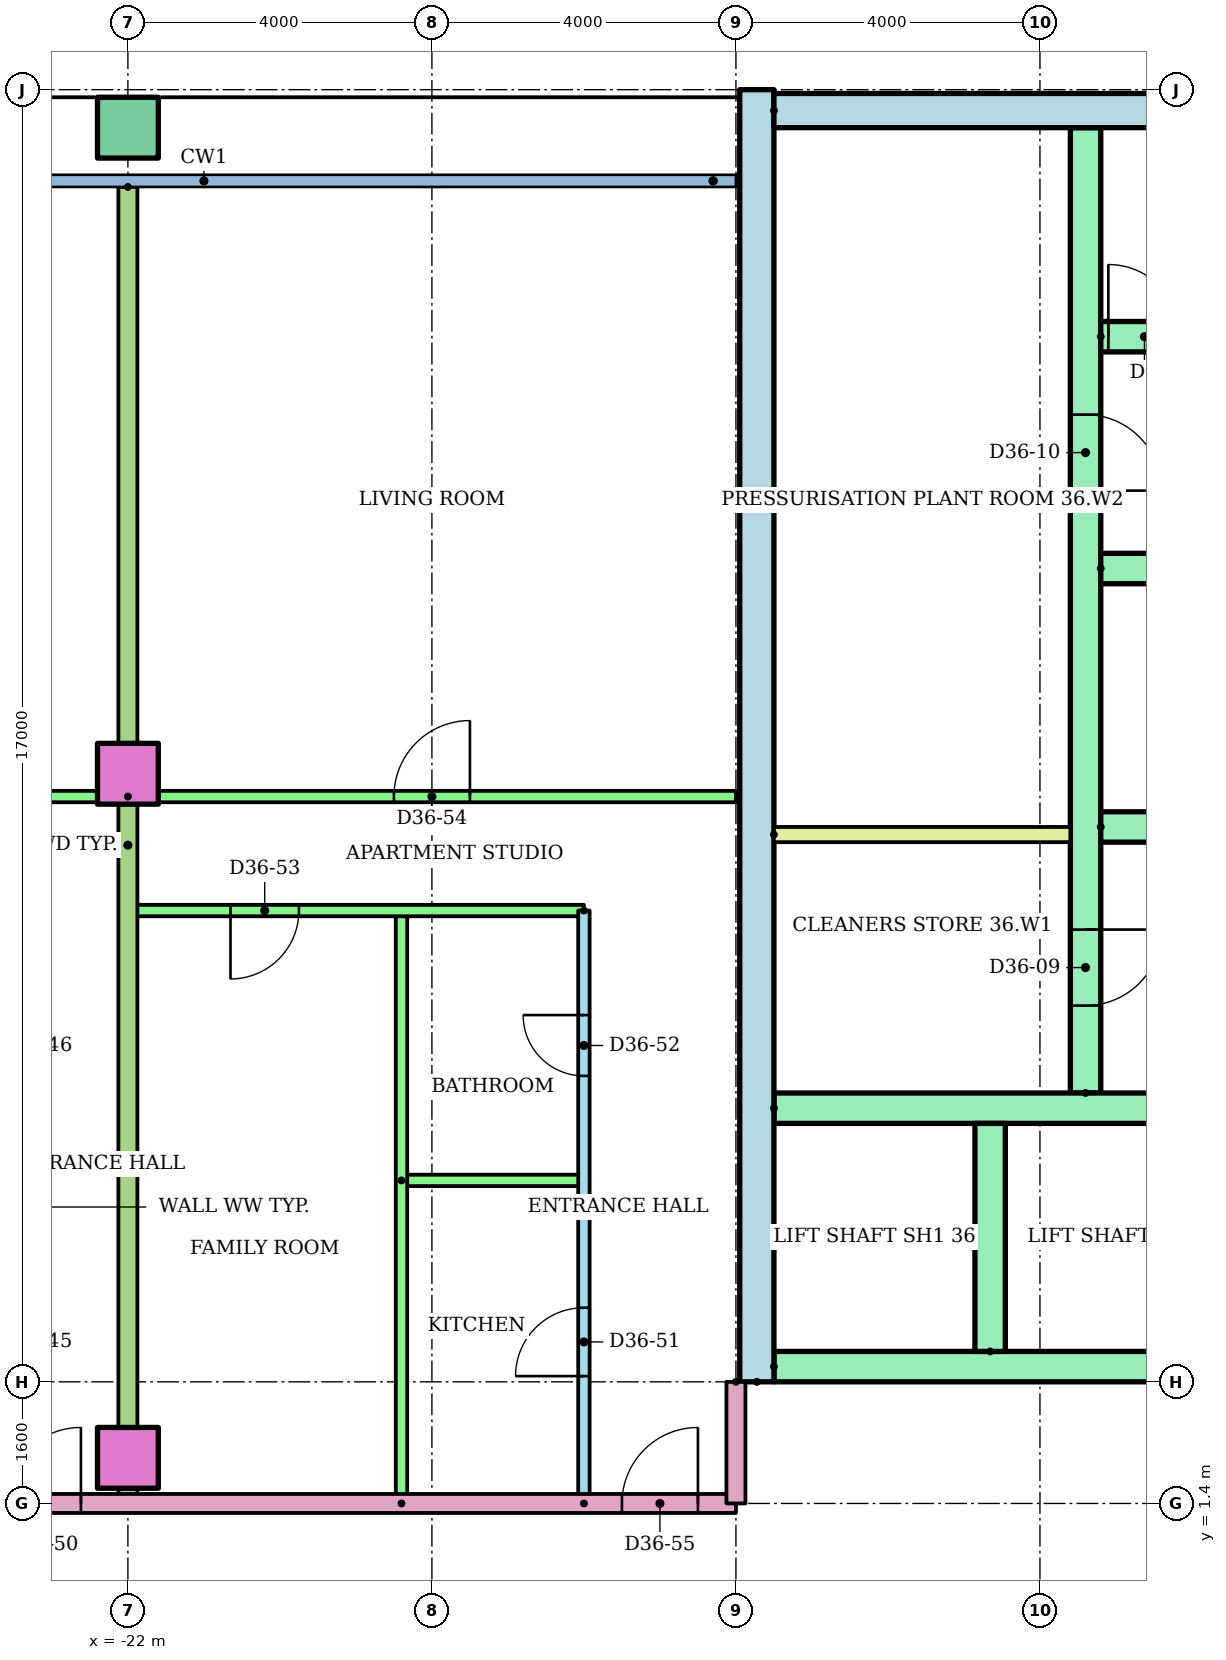
"""IFC4 building model, lengths in metres.
Left out: names, types, materials, properties, quantities, classifications, styles, units other than length and angle.
Written with IfcOpenShell. Run it as: python <this file> out.ifc"""

import sys

from ifc_helpers import new_model, si_unit, direction, frame, frame_2d, origin, origin_2d, place, context, subcontext, project, spatial, rectangle, hollow_rectangle, extrude, element, fill, save


model = new_model("IFC4")
c1 = context("Model", 3, precision=1e-05, world=origin(), true_north=direction((0.0, 1.0)))
c2 = subcontext(c1, "Body", "Model", "MODEL_VIEW")
j1 = project(units=[si_unit("LENGTHUNIT", "METRE"), si_unit("PLANEANGLEUNIT", "RADIAN")], contexts=[c1])
p1 = place(None, origin())
s1 = spatial("IfcSite", under=j1, at=p1, CompositionType="ELEMENT")
p2 = place(p1, origin())
s2 = spatial("IfcBuilding", under=s1, at=p2, CompositionType="ELEMENT")
p3 = place(p2, frame((0.0, 0.0, 139.0)))
s3 = spatial("IfcBuildingStorey", under=s2, at=p3, CompositionType="ELEMENT", Elevation=139.0)
for number, where in (
    (1, (-22.0, 2.0, 0.0)),
    (2, (-22.0, 11.0, 0.0)),
):
    element("IfcColumn", number, at=place(p3, frame(where)), inside=s3, PredefinedType="COLUMN", context=c2, shape_type="SweptSolid", body=[
        extrude(rectangle(XDim=0.8, YDim=0.8, at=origin_2d()), origin(), (0.0, 0.0, 1.0), 3.2),
    ])
p4 = place(p3, frame((-22.0, 19.5, 0.0)))
e3 = element("IfcColumn", 3, at=p4, inside=s3, PredefinedType="COLUMN", context=c2, shape_type="SweptSolid", body=[
    extrude(hollow_rectangle(XDim=0.8, YDim=0.8, WallThickness=0.04, at=origin_2d()), origin(), (0.0, 0.0, 1.0), 3.2),
])
p5 = place(p3, frame((-13.725, 3.0, 0.0), z_axis=(0.0, 0.0, 1.0), x_axis=(0.0, 1.0, 0.0)))
e4 = element("IfcWall", 4, at=p5, inside=s3, PredefinedType="SHEAR", context=c2, shape_type="SweptSolid", body=[
    extrude(rectangle(XDim=17.0, YDim=0.45, at=frame_2d((8.5, 0.0))), origin(), (0.0, 0.0, 1.0), 2.92),
])
p6 = place(p3, frame((-13.5, 19.725, 0.0)))
e5 = element("IfcWall", 5, at=p6, inside=s3, PredefinedType="SHEAR", context=c2, shape_type="SweptSolid", body=[
    extrude(rectangle(XDim=27.0, YDim=0.45, at=frame_2d((13.5, 0.0))), origin(), (0.0, 0.0, 1.0), 2.92),
])
p7 = place(p3, frame((-9.4, 6.8, 0.0), z_axis=(0.0, 0.0, 1.0), x_axis=(0.0, 1.0, 0.0)))
e6 = element("IfcWall", 6, at=p7, inside=s3, PredefinedType="SHEAR", context=c2, shape_type="SweptSolid", body=[
    extrude(rectangle(XDim=12.7, YDim=0.4, at=frame_2d((6.35, 0.0))), origin(), (0.0, 0.0, 1.0), 2.92),
])
p8 = place(p7, frame((1.15, 0.0, 0.0)))
e7 = element("IfcOpeningElement", 7, at=p8, cuts=e6, PredefinedType="OPENING", context=c2, shape_type="SweptSolid", body=[
    extrude(rectangle(XDim=1.0, YDim=2.1, at=frame_2d((0.5, 1.05))), frame((0.0, 0.21, 0.0), z_axis=(0.0, -1.0, 0.0), x_axis=(1.0, 0.0, 0.0)), (0.0, 0.0, 1.0), 0.42),
])
p9 = place(p7, frame((7.925, 0.0, 0.0)))
e8 = element("IfcOpeningElement", 8, at=p9, cuts=e6, PredefinedType="OPENING", context=c2, shape_type="SweptSolid", body=[
    extrude(rectangle(XDim=1.0, YDim=2.1, at=frame_2d((0.5, 1.05))), frame((0.0, 0.21, 0.0), z_axis=(0.0, -1.0, 0.0), x_axis=(1.0, 0.0, 0.0)), (0.0, 0.0, 1.0), 0.42),
])
p10 = place(p3, frame((-13.5, 3.2, 0.0)))
e9 = element("IfcWall", 9, at=p10, inside=s3, PredefinedType="SHEAR", context=c2, shape_type="SweptSolid", body=[
    extrude(rectangle(XDim=27.0, YDim=0.4, at=frame_2d((13.5, 0.0))), origin(), (0.0, 0.0, 1.0), 2.92),
])
p11 = place(p10, frame((6.861, 0.0, 0.0)))
e10 = element("IfcOpeningElement", 10, at=p11, cuts=e9, PredefinedType="OPENING", context=c2, shape_type="SweptSolid", body=[
    extrude(rectangle(XDim=1.1, YDim=2.1, at=frame_2d((0.55, 1.05))), frame((0.0, 0.21, 0.0), z_axis=(0.0, -1.0, 0.0), x_axis=(1.0, 0.0, 0.0)), (0.0, 0.0, 1.0), 0.42),
])
p12 = place(p10, frame((9.906, 0.0, 0.0)))
e11 = element("IfcOpeningElement", 11, at=p12, cuts=e9, PredefinedType="OPENING", context=c2, shape_type="SweptSolid", body=[
    extrude(rectangle(XDim=1.1, YDim=2.1, at=frame_2d((0.55, 1.05))), frame((0.0, 0.21, 0.0), z_axis=(0.0, -1.0, 0.0), x_axis=(1.0, 0.0, 0.0)), (0.0, 0.0, 1.0), 0.42),
])
p13 = place(p10, frame((15.994, 0.0, 0.0)))
e12 = element("IfcOpeningElement", 12, at=p13, cuts=e9, PredefinedType="OPENING", context=c2, shape_type="SweptSolid", body=[
    extrude(rectangle(XDim=1.1, YDim=2.1, at=frame_2d((0.55, 1.05))), frame((0.0, 0.21, 0.0), z_axis=(0.0, -1.0, 0.0), x_axis=(1.0, 0.0, 0.0)), (0.0, 0.0, 1.0), 0.42),
])
p14 = place(p10, frame((19.039, 0.0, 0.0)))
e13 = element("IfcOpeningElement", 13, at=p14, cuts=e9, PredefinedType="OPENING", context=c2, shape_type="SweptSolid", body=[
    extrude(rectangle(XDim=1.1, YDim=2.1, at=frame_2d((0.55, 1.05))), frame((0.0, 0.21, 0.0), z_axis=(0.0, -1.0, 0.0), x_axis=(1.0, 0.0, 0.0)), (0.0, 0.0, 1.0), 0.42),
])
p15 = place(p10, frame((12.6, 0.0, 0.0)))
e14 = element("IfcOpeningElement", 14, at=p15, cuts=e9, PredefinedType="OPENING", context=c2, shape_type="SweptSolid", body=[
    extrude(rectangle(XDim=1.8, YDim=2.1, at=frame_2d((0.9, 1.05))), frame((0.0, 0.21, 0.0), z_axis=(0.0, -1.0, 0.0), x_axis=(1.0, 0.0, 0.0)), (0.0, 0.0, 1.0), 0.42),
])
p16 = place(p3, frame((-13.5, 6.6, 0.0)))
e15 = element("IfcWall", 15, at=p16, inside=s3, PredefinedType="SHEAR", context=c2, shape_type="SweptSolid", body=[
    extrude(rectangle(XDim=11.978, YDim=0.4, at=frame_2d((5.989, 0.0))), origin(), (0.0, 0.0, 1.0), 2.92),
])
p17 = place(p3, frame((-10.656, 3.4, 0.0), z_axis=(0.0, 0.0, 1.0), x_axis=(0.0, 1.0, 0.0)))
e16 = element("IfcWall", 16, at=p17, inside=s3, PredefinedType="SHEAR", context=c2, shape_type="SweptSolid", body=[
    extrude(rectangle(XDim=3.0, YDim=0.4, at=frame_2d((1.5, 0.0))), origin(), (0.0, 0.0, 1.0), 2.92),
])
p18 = place(p3, frame((-9.2, 10.3, 0.0)))
e17 = element("IfcWall", 17, at=p18, inside=s3, PredefinedType="SHEAR", context=c2, shape_type="SweptSolid", body=[
    extrude(rectangle(XDim=8.0, YDim=0.4, at=frame_2d((4.0, 0.0))), origin(), (0.0, 0.0, 1.0), 2.92),
])
p19 = place(p18, frame((2.033, 0.0, 0.0)))
e18 = element("IfcOpeningElement", 18, at=p19, cuts=e17, PredefinedType="OPENING", context=c2, shape_type="SweptSolid", body=[
    extrude(rectangle(XDim=1.0, YDim=2.1, at=frame_2d((0.5, 1.05))), frame((0.0, 0.21, 0.0), z_axis=(0.0, -1.0, 0.0), x_axis=(1.0, 0.0, 0.0)), (0.0, 0.0, 1.0), 0.42),
])
p20 = place(p18, frame((6.133, 0.0, 0.0)))
e19 = element("IfcOpeningElement", 19, at=p20, cuts=e17, PredefinedType="OPENING", context=c2, shape_type="SweptSolid", body=[
    extrude(rectangle(XDim=1.0, YDim=2.1, at=frame_2d((0.5, 1.05))), frame((0.0, 0.21, 0.0), z_axis=(0.0, -1.0, 0.0), x_axis=(1.0, 0.0, 0.0)), (0.0, 0.0, 1.0), 0.42),
])
p21 = place(p3, frame((-9.2, 13.7, 0.0)))
e20 = element("IfcWall", 20, at=p21, inside=s3, PredefinedType="SHEAR", context=c2, shape_type="SweptSolid", body=[
    extrude(rectangle(XDim=8.0, YDim=0.4, at=frame_2d((4.0, 0.0))), origin(), (0.0, 0.0, 1.0), 2.92),
])
p22 = place(p3, frame((-9.2, 16.75, 0.0)))
e21 = element("IfcWall", 21, at=p22, inside=s3, PredefinedType="SHEAR", context=c2, shape_type="SweptSolid", body=[
    extrude(rectangle(XDim=18.4, YDim=0.4, at=frame_2d((9.2, 0.0))), origin(), (0.0, 0.0, 1.0), 2.92),
])
p23 = place(p22, frame((0.1, 0.0, 0.0)))
e22 = element("IfcOpeningElement", 22, at=p23, cuts=e21, PredefinedType="OPENING", context=c2, shape_type="SweptSolid", body=[
    extrude(rectangle(XDim=0.95, YDim=2.1, at=frame_2d((0.475, 1.05))), frame((0.0, 0.21, 0.0), z_axis=(0.0, -1.0, 0.0), x_axis=(1.0, 0.0, 0.0)), (0.0, 0.0, 1.0), 0.42),
])
p24 = place(p22, frame((6.1, 0.0, 0.0)))
e23 = element("IfcOpeningElement", 23, at=p24, cuts=e21, PredefinedType="OPENING", context=c2, shape_type="SweptSolid", body=[
    extrude(rectangle(XDim=0.95, YDim=2.1, at=frame_2d((0.475, 1.05))), frame((0.0, 0.21, 0.0), z_axis=(0.0, -1.0, 0.0), x_axis=(1.0, 0.0, 0.0)), (0.0, 0.0, 1.0), 0.42),
])
p25 = place(p22, frame((12.1, 0.0, 0.0)))
e24 = element("IfcOpeningElement", 24, at=p25, cuts=e21, PredefinedType="OPENING", context=c2, shape_type="SweptSolid", body=[
    extrude(rectangle(XDim=0.95, YDim=2.1, at=frame_2d((0.475, 1.05))), frame((0.0, 0.21, 0.0), z_axis=(0.0, -1.0, 0.0), x_axis=(1.0, 0.0, 0.0)), (0.0, 0.0, 1.0), 0.42),
])
p26 = place(p3, frame((-13.5, 10.2, 0.0)))
e25 = element("IfcWall", 25, at=p26, inside=s3, PredefinedType="PARTITIONING", context=c2, shape_type="SweptSolid", body=[
    extrude(rectangle(XDim=3.9, YDim=0.2, at=frame_2d((1.95, 0.0))), origin(), (0.0, 0.0, 1.0), 2.92),
])
p27 = place(p3, frame((-32.72, 10.7, 0.0)))
e26 = element("IfcWall", 26, at=p27, inside=s3, PredefinedType="PARTITIONING", context=c2, shape_type="SweptSolid", body=[
    extrude(rectangle(XDim=10.72, YDim=0.15, at=frame_2d((5.36, 0.0))), origin(), (0.0, 0.0, 1.0), 2.4),
])
p28 = place(p27, frame((1.102, 0.0, 0.0)))
e27 = element("IfcOpeningElement", 27, at=p28, cuts=e26, PredefinedType="OPENING", context=c2, shape_type="SweptSolid", body=[
    extrude(rectangle(XDim=1.0, YDim=2.1, at=frame_2d((0.5, 1.05))), frame((0.0, 0.085, 0.0), z_axis=(0.0, -1.0, 0.0), x_axis=(1.0, 0.0, 0.0)), (0.0, 0.0, 1.0), 0.17),
])
p29 = place(p27, frame((7.27, 0.0, 0.0)))
e28 = element("IfcOpeningElement", 28, at=p29, cuts=e26, PredefinedType="OPENING", context=c2, shape_type="SweptSolid", body=[
    extrude(rectangle(XDim=0.9, YDim=2.1, at=frame_2d((0.45, 1.05))), frame((0.0, 0.085, 0.0), z_axis=(0.0, -1.0, 0.0), x_axis=(1.0, 0.0, 0.0)), (0.0, 0.0, 1.0), 0.17),
])
p30 = place(p3, frame((-16.0, 1.4, 0.0), z_axis=(0.0, 0.0, 1.0), x_axis=(0.0, 1.0, 0.0)))
e29 = element("IfcWall", 29, at=p30, inside=s3, PredefinedType="PARTITIONING", context=c2, shape_type="SweptSolid", body=[
    extrude(rectangle(XDim=7.8, YDim=0.15, at=frame_2d((3.9, 0.0))), origin(), (0.0, 0.0, 1.0), 2.4),
])
p31 = place(p30, frame((1.675, 0.0, 0.0)))
e30 = element("IfcOpeningElement", 30, at=p31, cuts=e29, PredefinedType="OPENING", context=c2, shape_type="SweptSolid", body=[
    extrude(rectangle(XDim=0.9, YDim=2.1, at=frame_2d((0.45, 1.05))), frame((0.0, 0.085, 0.0), z_axis=(0.0, -1.0, 0.0), x_axis=(1.0, 0.0, 0.0)), (0.0, 0.0, 1.0), 0.17),
])
p32 = place(p30, frame((5.625, 0.0, 0.0)))
e31 = element("IfcOpeningElement", 31, at=p32, cuts=e29, PredefinedType="OPENING", context=c2, shape_type="SweptSolid", body=[
    extrude(rectangle(XDim=0.8, YDim=2.1, at=frame_2d((0.4, 1.05))), frame((0.0, 0.085, 0.0), z_axis=(0.0, -1.0, 0.0), x_axis=(1.0, 0.0, 0.0)), (0.0, 0.0, 1.0), 0.17),
])
p33 = place(p3, frame((-18.4, 5.65, 0.0)))
e32 = element("IfcWall", 32, at=p33, inside=s3, PredefinedType="PARTITIONING", context=c2, shape_type="SweptSolid", body=[
    extrude(rectangle(XDim=2.4, YDim=0.15, at=frame_2d((1.2, 0.0))), origin(), (0.0, 0.0, 1.0), 2.4),
])
p34 = place(p3, frame((-18.4, 1.4, 0.0), z_axis=(0.0, 0.0, 1.0), x_axis=(0.0, 1.0, 0.0)))
e33 = element("IfcWall", 33, at=p34, inside=s3, PredefinedType="PARTITIONING", context=c2, shape_type="SweptSolid", body=[
    extrude(rectangle(XDim=7.8, YDim=0.15, at=frame_2d((3.9, 0.0))), origin(), (0.0, 0.0, 1.0), 2.4),
])
p35 = place(p3, frame((-16.0, 9.2, 0.0), z_axis=(0.0, 0.0, 1.0), x_axis=(-1.0, 0.0, 0.0)))
e34 = element("IfcWall", 34, at=p35, inside=s3, PredefinedType="PARTITIONING", context=c2, shape_type="SweptSolid", body=[
    extrude(rectangle(XDim=6.0, YDim=0.15, at=frame_2d((3.0, 0.0))), origin(), (0.0, 0.0, 1.0), 2.4),
])
p36 = place(p35, frame((3.75, 0.0, 0.0)))
e35 = element("IfcOpeningElement", 35, at=p36, cuts=e34, PredefinedType="OPENING", context=c2, shape_type="SweptSolid", body=[
    extrude(rectangle(XDim=0.9, YDim=2.1, at=frame_2d((0.45, 1.05))), frame((0.0, 0.085, 0.0), z_axis=(0.0, -1.0, 0.0), x_axis=(1.0, 0.0, 0.0)), (0.0, 0.0, 1.0), 0.17),
])
p37 = place(p3, frame((-22.0, 10.7, 0.0)))
e36 = element("IfcWall", 36, at=p37, inside=s3, PredefinedType="PARTITIONING", context=c2, shape_type="SweptSolid", body=[
    extrude(rectangle(XDim=8.0, YDim=0.15, at=frame_2d((4.0, 0.0))), origin(), (0.0, 0.0, 1.0), 2.4),
])
p38 = place(p37, frame((3.5, 0.0, 0.0)))
e37 = element("IfcOpeningElement", 37, at=p38, cuts=e36, PredefinedType="OPENING", context=c2, shape_type="SweptSolid", body=[
    extrude(rectangle(XDim=1.0, YDim=2.1, at=frame_2d((0.5, 1.05))), frame((0.0, 0.085, 0.0), z_axis=(0.0, -1.0, 0.0), x_axis=(1.0, 0.0, 0.0)), (0.0, 0.0, 1.0), 0.17),
])
p39 = place(p3, frame((-22.0, 18.721, 0.0), z_axis=(0.0, 0.0, 1.0), x_axis=(0.0, -1.0, 0.0)))
e38 = element("IfcWall", 38, at=p39, inside=s3, PredefinedType="PARTITIONING", context=c2, shape_type="SweptSolid", body=[
    extrude(rectangle(XDim=17.321, YDim=0.25, at=frame_2d((8.661, 0.0))), origin(), (0.0, 0.0, 1.0), 2.4),
])
p40 = place(p3, frame((-29.0, 1.4, 0.0)))
e39 = element("IfcWall", 39, at=p40, inside=s3, PredefinedType="PARTITIONING", context=c2, shape_type="SweptSolid", body=[
    extrude(rectangle(XDim=15.0, YDim=0.25, at=frame_2d((7.5, 0.0))), origin(), (0.0, 0.0, 1.0), 2.4),
])
p41 = place(p40, frame((5.382, 0.0, 0.0)))
e40 = element("IfcOpeningElement", 40, at=p41, cuts=e39, PredefinedType="OPENING", context=c2, shape_type="SweptSolid", body=[
    extrude(rectangle(XDim=1.0, YDim=2.1, at=frame_2d((0.5, 1.05))), frame((0.0, 0.135, 0.0), z_axis=(0.0, -1.0, 0.0), x_axis=(1.0, 0.0, 0.0)), (0.0, 0.0, 1.0), 0.27),
])
p42 = place(p40, frame((13.5, 0.0, 0.0)))
e41 = element("IfcOpeningElement", 41, at=p42, cuts=e39, PredefinedType="OPENING", context=c2, shape_type="SweptSolid", body=[
    extrude(rectangle(XDim=1.0, YDim=2.1, at=frame_2d((0.5, 1.05))), frame((0.0, 0.135, 0.0), z_axis=(0.0, -1.0, 0.0), x_axis=(1.0, 0.0, 0.0)), (0.0, 0.0, 1.0), 0.27),
])
p43 = place(p3, frame((-14.0, 3.0, 0.0), z_axis=(0.0, 0.0, 1.0), x_axis=(0.0, -1.0, 0.0)))
e42 = element("IfcWall", 42, at=p43, inside=s3, PredefinedType="PARTITIONING", context=c2, shape_type="SweptSolid", body=[
    extrude(rectangle(XDim=1.6, YDim=0.25, at=frame_2d((0.8, 0.0))), origin(), (0.0, 0.0, 1.0), 2.4),
])
p44 = place(p23, origin())
e43 = element("IfcDoor", 43, at=p44, inside=s3, OperationType="SINGLE_SWING_LEFT", PredefinedType="DOOR", context=c2, shape_type="SweptSolid", body=[
    extrude(rectangle(XDim=0.95, YDim=2.1, at=frame_2d((0.475, 1.05))), frame((0.0, 0.025, 0.0), z_axis=(0.0, -1.0, 0.0), x_axis=(1.0, 0.0, 0.0)), (0.0, 0.0, 1.0), 0.05),
])
fill(e22, e43)
p45 = place(p8, frame((1.0, 0.0, 0.0), z_axis=(0.0, 0.0, 1.0), x_axis=(-1.0, 0.0, 0.0)))
e44 = element("IfcDoor", 44, at=p45, inside=s3, OperationType="SINGLE_SWING_RIGHT", PredefinedType="DOOR", context=c2, shape_type="SweptSolid", body=[
    extrude(rectangle(XDim=1.0, YDim=2.1, at=frame_2d((0.5, 1.05))), frame((0.0, 0.025, 0.0), z_axis=(0.0, -1.0, 0.0), x_axis=(1.0, 0.0, 0.0)), (0.0, 0.0, 1.0), 0.05),
])
fill(e7, e44)
p46 = place(p9, frame((1.0, 0.0, 0.0), z_axis=(0.0, 0.0, 1.0), x_axis=(-1.0, 0.0, 0.0)))
e45 = element("IfcDoor", 45, at=p46, inside=s3, OperationType="SINGLE_SWING_LEFT", PredefinedType="DOOR", context=c2, shape_type="SweptSolid", body=[
    extrude(rectangle(XDim=1.0, YDim=2.1, at=frame_2d((0.5, 1.05))), frame((0.0, 0.025, 0.0), z_axis=(0.0, -1.0, 0.0), x_axis=(1.0, 0.0, 0.0)), (0.0, 0.0, 1.0), 0.05),
])
fill(e8, e45)
p47 = place(p41, origin())
e46 = element("IfcDoor", 46, at=p47, inside=s3, OperationType="SINGLE_SWING_RIGHT", PredefinedType="DOOR", context=c2, shape_type="SweptSolid", body=[
    extrude(rectangle(XDim=1.0, YDim=2.1, at=frame_2d((0.5, 1.05))), frame((0.0, 0.025, 0.0), z_axis=(0.0, -1.0, 0.0), x_axis=(1.0, 0.0, 0.0)), (0.0, 0.0, 1.0), 0.05),
])
fill(e40, e46)
p48 = place(p31, origin())
e47 = element("IfcDoor", 47, at=p48, inside=s3, OperationType="SINGLE_SWING_LEFT", PredefinedType="DOOR", context=c2, shape_type="SweptSolid", body=[
    extrude(rectangle(XDim=0.9, YDim=2.1, at=frame_2d((0.45, 1.05))), frame((0.0, 0.025, 0.0), z_axis=(0.0, -1.0, 0.0), x_axis=(1.0, 0.0, 0.0)), (0.0, 0.0, 1.0), 0.05),
])
fill(e30, e47)
p49 = place(p32, origin())
e48 = element("IfcDoor", 48, at=p49, inside=s3, OperationType="SINGLE_SWING_RIGHT", PredefinedType="DOOR", context=c2, shape_type="SweptSolid", body=[
    extrude(rectangle(XDim=0.8, YDim=2.1, at=frame_2d((0.4, 1.05))), frame((0.0, 0.025, 0.0), z_axis=(0.0, -1.0, 0.0), x_axis=(1.0, 0.0, 0.0)), (0.0, 0.0, 1.0), 0.05),
])
fill(e31, e48)
p50 = place(p36, origin())
e49 = element("IfcDoor", 49, at=p50, inside=s3, OperationType="SINGLE_SWING_RIGHT", PredefinedType="DOOR", context=c2, shape_type="SweptSolid", body=[
    extrude(rectangle(XDim=0.9, YDim=2.1, at=frame_2d((0.45, 1.05))), frame((0.0, 0.025, 0.0), z_axis=(0.0, -1.0, 0.0), x_axis=(1.0, 0.0, 0.0)), (0.0, 0.0, 1.0), 0.05),
])
fill(e35, e49)
p51 = place(p38, origin())
e50 = element("IfcDoor", 50, at=p51, inside=s3, OperationType="SINGLE_SWING_RIGHT", PredefinedType="DOOR", context=c2, shape_type="SweptSolid", body=[
    extrude(rectangle(XDim=1.0, YDim=2.1, at=frame_2d((0.5, 1.05))), frame((0.0, 0.025, 0.0), z_axis=(0.0, -1.0, 0.0), x_axis=(1.0, 0.0, 0.0)), (0.0, 0.0, 1.0), 0.05),
])
fill(e37, e50)
p52 = place(p42, origin())
e51 = element("IfcDoor", 51, at=p52, inside=s3, OperationType="SINGLE_SWING_RIGHT", PredefinedType="DOOR", context=c2, shape_type="SweptSolid", body=[
    extrude(rectangle(XDim=1.0, YDim=2.1, at=frame_2d((0.5, 1.05))), frame((0.0, 0.025, 0.0), z_axis=(0.0, -1.0, 0.0), x_axis=(1.0, 0.0, 0.0)), (0.0, 0.0, 1.0), 0.05),
])
fill(e41, e51)
save(model, sys.argv[1])
